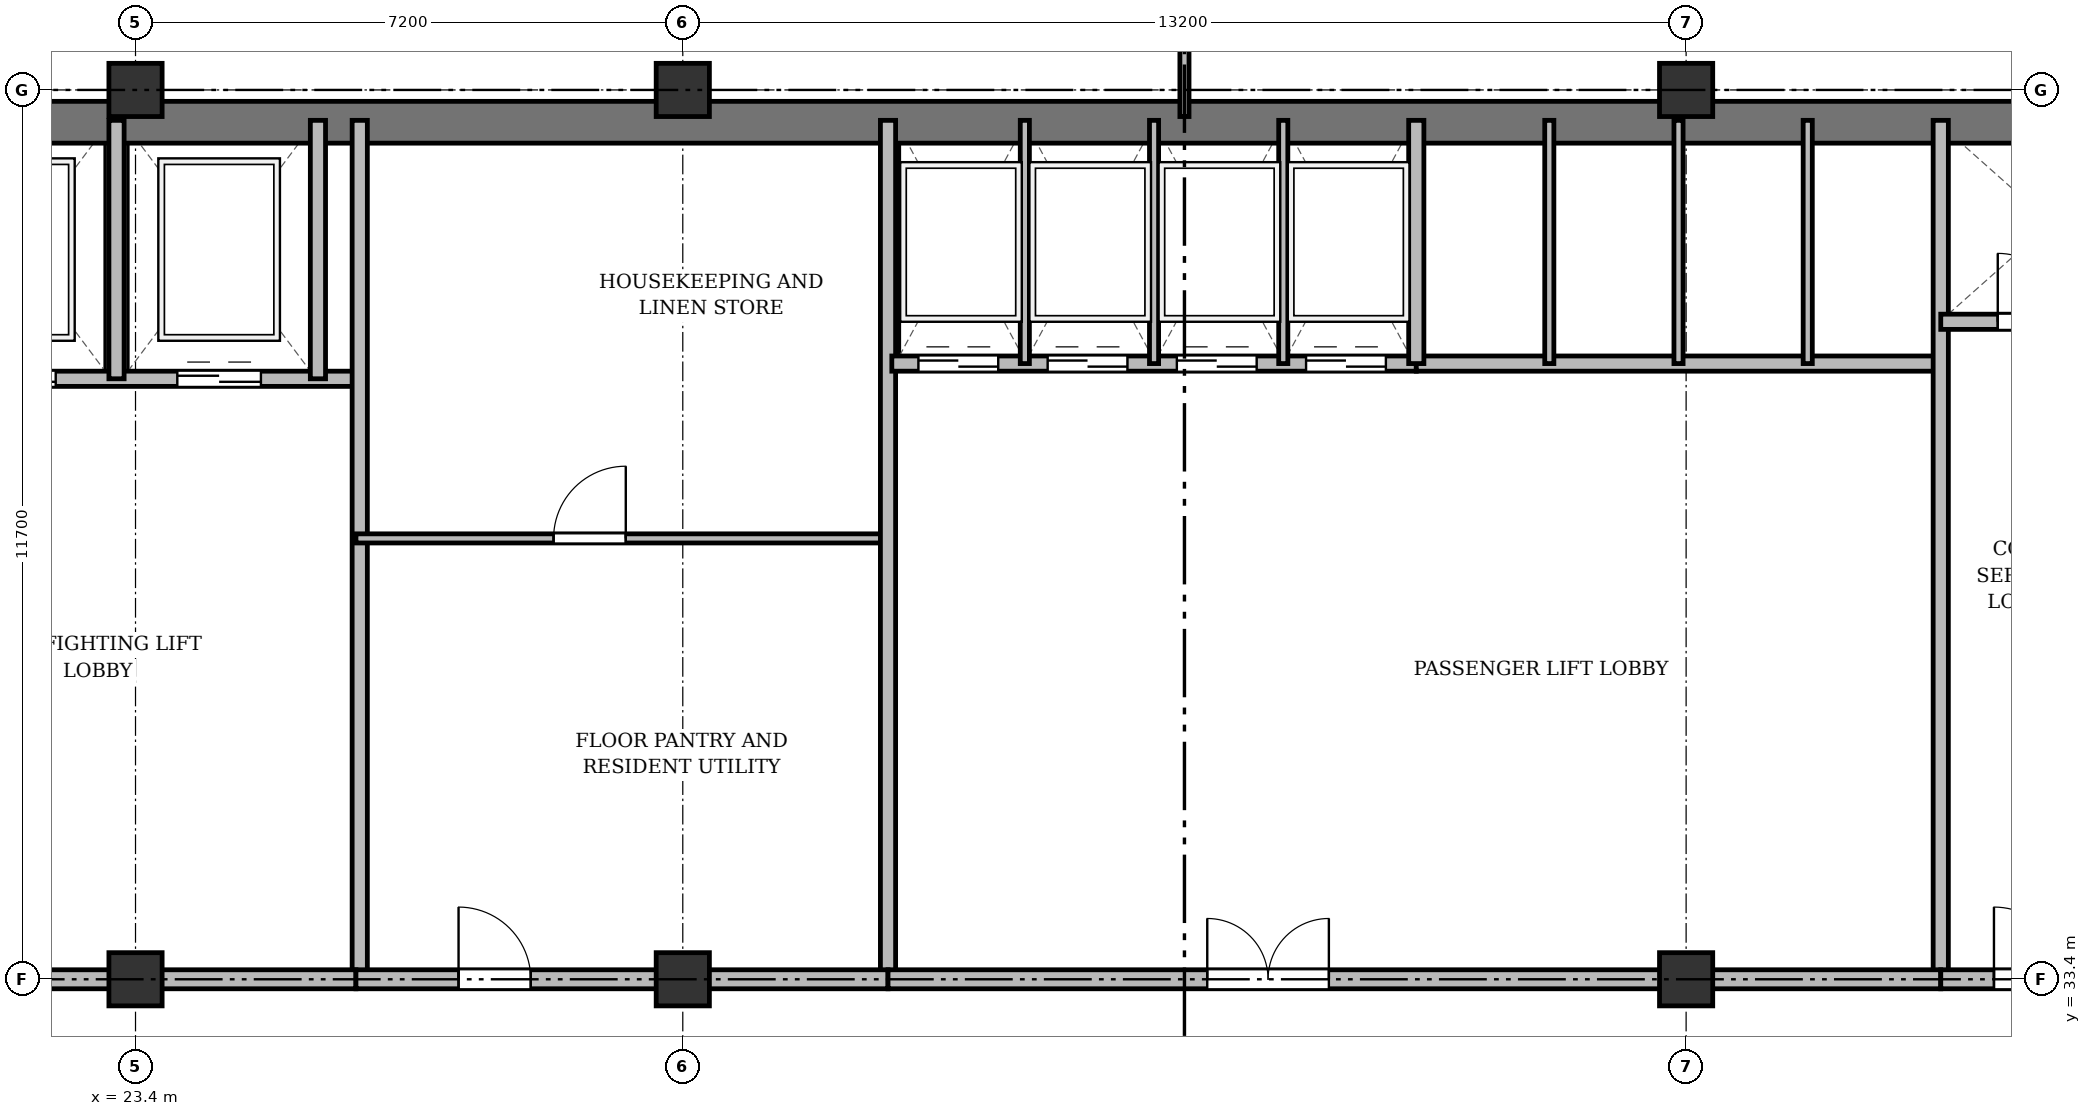
"""IFC4 building model, lengths in metres.
Left out: names, types, materials, properties, quantities, classifications, styles, units other than length and angle.
Written with IfcOpenShell. Run it as: python <this file> out.ifc"""

import sys

from ifc_helpers import new_model, si_unit, direction, frame, frame_2d, origin, origin_2d, place, context, subcontext, project, spatial, rectangle, extrude, source, transform, mapped, element, fill, save


model = new_model("IFC4")
c1 = context("Model", 3, precision=1e-05, world=origin(), true_north=direction((0.0, 1.0)))
c2 = subcontext(c1, "Body", "Model", "MODEL_VIEW")
j1 = project(units=[si_unit("LENGTHUNIT", "METRE"), si_unit("PLANEANGLEUNIT", "RADIAN")], contexts=[c1])
p1 = place(None, origin())
s1 = spatial("IfcSite", under=j1, at=p1, CompositionType="ELEMENT")
p2 = place(p1, origin())
s2 = spatial("IfcBuilding", under=s1, at=p2, CompositionType="ELEMENT")
p3 = place(p2, frame((0.0, 0.0, 190.5)))
s3 = spatial("IfcBuildingStorey", under=s2, at=p3, CompositionType="ELEMENT", Elevation=190.5)
m1 = source(origin(), c2, "Body", "SweptSolid", [
    extrude(rectangle(XDim=0.7, YDim=0.7, at=origin_2d()), origin(), (0.0, 0.0, 1.0), 3.6),
])
for number, where, z_axis, x_axis in (
    (1, (23.4, 33.4, 0.0), (0.0, 0.0, 1.0), (1.0, 0.0, 0.0)),
    (2, (23.4, 45.1, 0.0), (0.0, 0.0, 1.0), (1.0, 0.0, 0.0)),
    (3, (30.6, 33.4, 0.0), (0.0, 0.0, 1.0), (1.0, 0.0, 0.0)),
    (4, (30.6, 45.1, 0.0), (0.0, 0.0, 1.0), (1.0, 0.0, 0.0)),
    (5, (43.8, 33.4, 0.0), (0.0, 0.0, 1.0), (1.0, 0.0, 0.0)),
    (6, (43.8, 45.1, 0.0), (0.0, 0.0, 1.0), (1.0, 0.0, 0.0)),
):
    element("IfcColumn", number, at=place(p3, frame(where, z_axis=z_axis, x_axis=x_axis)), inside=s3, PredefinedType="COLUMN", context=c2, shape_type="MappedRepresentation", body=[
        mapped(m1, transform((0.0, 0.0, 0.0), x_axis=(1.0, 0.0, 0.0), y_axis=(0.0, 1.0, 0.0), z_axis=(0.0, 0.0, 1.0), scale=1.0)),
    ])
p4 = place(p3, frame((15.65, 44.675, 0.0), z_axis=(0.0, 0.0, 1.0), x_axis=(1.0, 0.0, 0.0)))
e7 = element("IfcWall", 7, at=p4, inside=s3, PredefinedType="SHEAR", context=c2, shape_type="SweptSolid", body=[
    extrude(rectangle(XDim=43.1, YDim=0.55, at=frame_2d((21.55, 0.0))), origin(), (0.0, 0.0, 1.0), 3.36),
])
p5 = place(p3, frame((19.55, 41.3, 0.0), z_axis=(0.0, 0.0, 1.0), x_axis=(1.0, 0.0, 0.0)))
e8 = element("IfcWall", 8, at=p5, inside=s3, PredefinedType="SOLIDWALL", context=c2, shape_type="SweptSolid", body=[
    extrude(rectangle(XDim=6.75, YDim=0.2, at=frame_2d((3.375, 0.0))), origin(), (0.0, 0.0, 1.0), 3.36),
])
p6 = place(p5, frame((1.7, 0.0, 0.0)))
e9 = element("IfcOpeningElement", 9, at=p6, cuts=e8, PredefinedType="OPENING", context=c2, shape_type="SweptSolid", body=[
    extrude(rectangle(XDim=1.1, YDim=2.15, at=frame_2d((0.55, 1.075))), frame((0.0, 0.11, 0.0), z_axis=(0.0, -1.0, 0.0), x_axis=(1.0, 0.0, 0.0)), (0.0, 0.0, 1.0), 0.22),
])
p7 = place(p5, frame((4.4, 0.0, 0.0)))
e10 = element("IfcOpeningElement", 10, at=p7, cuts=e8, PredefinedType="OPENING", context=c2, shape_type="SweptSolid", body=[
    extrude(rectangle(XDim=1.1, YDim=2.15, at=frame_2d((0.55, 1.075))), frame((0.0, 0.11, 0.0), z_axis=(0.0, -1.0, 0.0), x_axis=(1.0, 0.0, 0.0)), (0.0, 0.0, 1.0), 0.22),
])
for number, where, z_axis, x_axis in (
    (11, (23.15, 41.3, 0.0), (0.0, 0.0, 1.0), (0.0, 1.0, 0.0)),
    (12, (25.8, 41.3, 0.0), (0.0, 0.0, 1.0), (0.0, 1.0, 0.0)),
):
    element("IfcWall", number, at=place(p3, frame(where, z_axis=z_axis, x_axis=x_axis)), inside=s3, PredefinedType="SOLIDWALL", context=c2, shape_type="SweptSolid", body=[
        extrude(rectangle(XDim=3.4, YDim=0.2, at=frame_2d((1.7, 0.0))), origin(), (0.0, 0.0, 1.0), 3.36),
    ])
p8 = place(p3, frame((26.35, 33.4, 0.0), z_axis=(0.0, 0.0, 1.0), x_axis=(0.0, 1.0, 0.0)))
e13 = element("IfcWall", 13, at=p8, inside=s3, PredefinedType="SOLIDWALL", context=c2, shape_type="SweptSolid", body=[
    extrude(rectangle(XDim=11.3, YDim=0.2, at=frame_2d((5.65, 0.0))), origin(), (0.0, 0.0, 1.0), 2.91),
])
p9 = place(p3, frame((19.5, 33.4, 0.0), z_axis=(0.0, 0.0, 1.0), x_axis=(1.0, 0.0, 0.0)))
e14 = element("IfcWall", 14, at=p9, inside=s3, PredefinedType="PARTITIONING", context=c2, shape_type="SweptSolid", body=[
    extrude(rectangle(XDim=6.8, YDim=0.25, at=frame_2d((3.4, 0.0))), origin(), (0.0, 0.0, 1.0), 2.91),
])
p10 = place(p9, frame((0.75, 0.0, 0.0)))
e15 = element("IfcOpeningElement", 15, at=p10, cuts=e14, PredefinedType="OPENING", context=c2, shape_type="SweptSolid", body=[
    extrude(rectangle(XDim=1.6, YDim=2.2, at=frame_2d((0.8, 1.1))), frame((0.0, 0.135, 0.0), z_axis=(0.0, -1.0, 0.0), x_axis=(1.0, 0.0, 0.0)), (0.0, 0.0, 1.0), 0.27),
])
p11 = place(p3, frame((26.3, 39.2, 0.0), z_axis=(0.0, 0.0, 1.0), x_axis=(1.0, 0.0, 0.0)))
e16 = element("IfcWall", 16, at=p11, inside=s3, PredefinedType="PARTITIONING", context=c2, shape_type="SweptSolid", body=[
    extrude(rectangle(XDim=7.0, YDim=0.12, at=frame_2d((3.5, 0.0))), origin(), (0.0, 0.0, 1.0), 2.86),
])
p12 = place(p11, frame((2.6, 0.0, 0.0)))
e17 = element("IfcOpeningElement", 17, at=p12, cuts=e16, PredefinedType="OPENING", context=c2, shape_type="SweptSolid", body=[
    extrude(rectangle(XDim=0.95, YDim=2.15, at=frame_2d((0.475, 1.075))), frame((0.0, 0.07, 0.0), z_axis=(0.0, -1.0, 0.0), x_axis=(1.0, 0.0, 0.0)), (0.0, 0.0, 1.0), 0.14),
])
p13 = place(p3, frame((33.3, 33.4, 0.0), z_axis=(0.0, 0.0, 1.0), x_axis=(0.0, 1.0, 0.0)))
e18 = element("IfcWall", 18, at=p13, inside=s3, PredefinedType="SOLIDWALL", context=c2, shape_type="SweptSolid", body=[
    extrude(rectangle(XDim=11.3, YDim=0.2, at=frame_2d((5.65, 0.0))), origin(), (0.0, 0.0, 1.0), 2.91),
])
p14 = place(p3, frame((33.35, 41.5, 0.0), z_axis=(0.0, 0.0, 1.0), x_axis=(1.0, 0.0, 0.0)))
e19 = element("IfcWall", 19, at=p14, inside=s3, PredefinedType="SOLIDWALL", context=c2, shape_type="SweptSolid", body=[
    extrude(rectangle(XDim=6.9, YDim=0.2, at=frame_2d((3.45, 0.0))), origin(), (0.0, 0.0, 1.0), 3.36),
])
p15 = place(p14, frame((0.35, 0.0, 0.0)))
e20 = element("IfcOpeningElement", 20, at=p15, cuts=e19, PredefinedType="OPENING", context=c2, shape_type="SweptSolid", body=[
    extrude(rectangle(XDim=1.05, YDim=2.15, at=frame_2d((0.525, 1.075))), frame((0.0, 0.11, 0.0), z_axis=(0.0, -1.0, 0.0), x_axis=(1.0, 0.0, 0.0)), (0.0, 0.0, 1.0), 0.22),
])
p16 = place(p14, frame((2.05, 0.0, 0.0)))
e21 = element("IfcOpeningElement", 21, at=p16, cuts=e19, PredefinedType="OPENING", context=c2, shape_type="SweptSolid", body=[
    extrude(rectangle(XDim=1.05, YDim=2.15, at=frame_2d((0.525, 1.075))), frame((0.0, 0.11, 0.0), z_axis=(0.0, -1.0, 0.0), x_axis=(1.0, 0.0, 0.0)), (0.0, 0.0, 1.0), 0.22),
])
p17 = place(p14, frame((3.75, 0.0, 0.0)))
e22 = element("IfcOpeningElement", 22, at=p17, cuts=e19, PredefinedType="OPENING", context=c2, shape_type="SweptSolid", body=[
    extrude(rectangle(XDim=1.05, YDim=2.15, at=frame_2d((0.525, 1.075))), frame((0.0, 0.11, 0.0), z_axis=(0.0, -1.0, 0.0), x_axis=(1.0, 0.0, 0.0)), (0.0, 0.0, 1.0), 0.22),
])
p18 = place(p14, frame((5.45, 0.0, 0.0)))
e23 = element("IfcOpeningElement", 23, at=p18, cuts=e19, PredefinedType="OPENING", context=c2, shape_type="SweptSolid", body=[
    extrude(rectangle(XDim=1.05, YDim=2.15, at=frame_2d((0.525, 1.075))), frame((0.0, 0.11, 0.0), z_axis=(0.0, -1.0, 0.0), x_axis=(1.0, 0.0, 0.0)), (0.0, 0.0, 1.0), 0.22),
])
for number, where, z_axis, x_axis in (
    (24, (35.1, 41.5, 0.0), (0.0, 0.0, 1.0), (0.0, 1.0, 0.0)),
    (25, (36.8, 41.5, 0.0), (0.0, 0.0, 1.0), (0.0, 1.0, 0.0)),
    (26, (38.5, 41.5, 0.0), (0.0, 0.0, 1.0), (0.0, 1.0, 0.0)),
):
    element("IfcWall", number, at=place(p3, frame(where, z_axis=z_axis, x_axis=x_axis)), inside=s3, PredefinedType="PARTITIONING", context=c2, shape_type="SweptSolid", body=[
        extrude(rectangle(XDim=3.2, YDim=0.12, at=frame_2d((1.6, 0.0))), origin(), (0.0, 0.0, 1.0), 3.36),
    ])
p19 = place(p3, frame((40.25, 41.5, 0.0), z_axis=(0.0, 0.0, 1.0), x_axis=(1.0, 0.0, 0.0)))
e27 = element("IfcWall", 27, at=p19, inside=s3, PredefinedType="SOLIDWALL", context=c2, shape_type="SweptSolid", body=[
    extrude(rectangle(XDim=6.9, YDim=0.2, at=frame_2d((3.45, 0.0))), origin(), (0.0, 0.0, 1.0), 2.86),
])
p20 = place(p3, frame((40.25, 41.5, 0.0), z_axis=(0.0, 0.0, 1.0), x_axis=(0.0, 1.0, 0.0)))
e28 = element("IfcWall", 28, at=p20, inside=s3, PredefinedType="SOLIDWALL", context=c2, shape_type="SweptSolid", body=[
    extrude(rectangle(XDim=3.2, YDim=0.2, at=frame_2d((1.6, 0.0))), origin(), (0.0, 0.0, 1.0), 3.36),
])
p21 = place(p3, frame((42.0, 41.5, 0.0), z_axis=(0.0, 0.0, 1.0), x_axis=(0.0, 1.0, 0.0)))
e29 = element("IfcWall", 29, at=p21, inside=s3, PredefinedType="PARTITIONING", context=c2, shape_type="SweptSolid", body=[
    extrude(rectangle(XDim=3.2, YDim=0.12, at=frame_2d((1.6, 0.0))), origin(), (0.0, 0.0, 1.0), 3.36),
])
p22 = place(p3, frame((43.7, 41.5, 0.0), z_axis=(0.0, 0.0, 1.0), x_axis=(0.0, 1.0, 0.0)))
e30 = element("IfcWall", 30, at=p22, inside=s3, PredefinedType="PARTITIONING", context=c2, shape_type="SweptSolid", body=[
    extrude(rectangle(XDim=3.2, YDim=0.12, at=frame_2d((1.6, 0.0))), origin(), (0.0, 0.0, 1.0), 2.86),
])
p23 = place(p3, frame((45.4, 41.5, 0.0), z_axis=(0.0, 0.0, 1.0), x_axis=(0.0, 1.0, 0.0)))
e31 = element("IfcWall", 31, at=p23, inside=s3, PredefinedType="PARTITIONING", context=c2, shape_type="SweptSolid", body=[
    extrude(rectangle(XDim=3.2, YDim=0.12, at=frame_2d((1.6, 0.0))), origin(), (0.0, 0.0, 1.0), 3.36),
])
p24 = place(p3, frame((47.15, 33.4, 0.0), z_axis=(0.0, 0.0, 1.0), x_axis=(0.0, 1.0, 0.0)))
e32 = element("IfcWall", 32, at=p24, inside=s3, PredefinedType="SOLIDWALL", context=c2, shape_type="SweptSolid", body=[
    extrude(rectangle(XDim=11.3, YDim=0.2, at=frame_2d((5.65, 0.0))), origin(), (0.0, 0.0, 1.0), 2.91),
])
p25 = place(p3, frame((26.3, 33.4, 0.0), z_axis=(0.0, 0.0, 1.0), x_axis=(1.0, 0.0, 0.0)))
e33 = element("IfcWall", 33, at=p25, inside=s3, PredefinedType="PARTITIONING", context=c2, shape_type="SweptSolid", body=[
    extrude(rectangle(XDim=7.0, YDim=0.25, at=frame_2d((3.5, 0.0))), origin(), (0.0, 0.0, 1.0), 2.91),
])
p26 = place(p25, frame((1.35, 0.0, 0.0)))
e34 = element("IfcOpeningElement", 34, at=p26, cuts=e33, PredefinedType="OPENING", context=c2, shape_type="SweptSolid", body=[
    extrude(rectangle(XDim=0.95, YDim=2.15, at=frame_2d((0.475, 1.075))), frame((0.0, 0.135, 0.0), z_axis=(0.0, -1.0, 0.0), x_axis=(1.0, 0.0, 0.0)), (0.0, 0.0, 1.0), 0.27),
])
p27 = place(p3, frame((33.3, 33.4, 0.0), z_axis=(0.0, 0.0, 1.0), x_axis=(1.0, 0.0, 0.0)))
e35 = element("IfcWall", 35, at=p27, inside=s3, PredefinedType="PARTITIONING", context=c2, shape_type="SweptSolid", body=[
    extrude(rectangle(XDim=13.85, YDim=0.25, at=frame_2d((6.925, 0.0))), origin(), (0.0, 0.0, 1.0), 2.91),
])
p28 = place(p27, frame((4.2, 0.0, 0.0)))
e36 = element("IfcOpeningElement", 36, at=p28, cuts=e35, PredefinedType="OPENING", context=c2, shape_type="SweptSolid", body=[
    extrude(rectangle(XDim=1.6, YDim=2.2, at=frame_2d((0.8, 1.1))), frame((0.0, 0.135, 0.0), z_axis=(0.0, -1.0, 0.0), x_axis=(1.0, 0.0, 0.0)), (0.0, 0.0, 1.0), 0.27),
])
p29 = place(p3, frame((47.15, 42.05, 0.0), z_axis=(0.0, 0.0, 1.0), x_axis=(1.0, 0.0, 0.0)))
e37 = element("IfcWall", 37, at=p29, inside=s3, PredefinedType="SOLIDWALL", context=c2, shape_type="SweptSolid", body=[
    extrude(rectangle(XDim=7.85, YDim=0.2, at=frame_2d((3.925, 0.0))), origin(), (0.0, 0.0, 1.0), 2.86),
])
p30 = place(p29, frame((0.75, 0.0, 0.0)))
e38 = element("IfcOpeningElement", 38, at=p30, cuts=e37, PredefinedType="OPENING", context=c2, shape_type="SweptSolid", body=[
    extrude(rectangle(XDim=0.9, YDim=2.1, at=frame_2d((0.45, 1.05))), frame((0.0, 0.11, 0.0), z_axis=(0.0, -1.0, 0.0), x_axis=(1.0, 0.0, 0.0)), (0.0, 0.0, 1.0), 0.22),
])
p31 = place(p29, frame((3.85, 0.0, 0.0)))
e39 = element("IfcOpeningElement", 39, at=p31, cuts=e37, PredefinedType="OPENING", context=c2, shape_type="SweptSolid", body=[
    extrude(rectangle(XDim=0.9, YDim=2.1, at=frame_2d((0.45, 1.05))), frame((0.0, 0.11, 0.0), z_axis=(0.0, -1.0, 0.0), x_axis=(1.0, 0.0, 0.0)), (0.0, 0.0, 1.0), 0.22),
])
p32 = place(p3, frame((47.15, 33.4, 0.0), z_axis=(0.0, 0.0, 1.0), x_axis=(1.0, 0.0, 0.0)))
e40 = element("IfcWall", 40, at=p32, inside=s3, PredefinedType="PARTITIONING", context=c2, shape_type="SweptSolid", body=[
    extrude(rectangle(XDim=11.15, YDim=0.25, at=frame_2d((5.575, 0.0))), origin(), (0.0, 0.0, 1.0), 2.91),
])
p33 = place(p32, frame((0.7, 0.0, 0.0)))
e41 = element("IfcOpeningElement", 41, at=p33, cuts=e40, PredefinedType="OPENING", context=c2, shape_type="SweptSolid", body=[
    extrude(rectangle(XDim=0.95, YDim=2.15, at=frame_2d((0.475, 1.075))), frame((0.0, 0.135, 0.0), z_axis=(0.0, -1.0, 0.0), x_axis=(1.0, 0.0, 0.0)), (0.0, 0.0, 1.0), 0.27),
])
p34 = place(p32, frame((6.0, 0.0, 0.0)))
e42 = element("IfcOpeningElement", 42, at=p34, cuts=e40, PredefinedType="OPENING", context=c2, shape_type="SweptSolid", body=[
    extrude(rectangle(XDim=1.2, YDim=2.15, at=frame_2d((0.6, 1.075))), frame((0.0, 0.135, 0.0), z_axis=(0.0, -1.0, 0.0), x_axis=(1.0, 0.0, 0.0)), (0.0, 0.0, 1.0), 0.27),
])
p35 = place(p3, frame((37.2, 44.75, 0.0), z_axis=(0.0, 0.0, 1.0), x_axis=(0.0, 1.0, 0.0)))
e43 = element("IfcWall", 43, at=p35, inside=s3, PredefinedType="PARTITIONING", context=c2, shape_type="SweptSolid", body=[
    extrude(rectangle(XDim=3.61, YDim=0.12, at=frame_2d((1.805, 0.0))), origin(), (0.0, 0.0, 1.0), 2.91),
])
p36 = place(p35, frame((1.1, 0.0, 0.0)))
e44 = element("IfcOpeningElement", 44, at=p36, cuts=e43, PredefinedType="OPENING", context=c2, shape_type="SweptSolid", body=[
    extrude(rectangle(XDim=0.95, YDim=2.15, at=frame_2d((0.475, 1.075))), frame((0.0, 0.07, 0.0), z_axis=(0.0, -1.0, 0.0), x_axis=(1.0, 0.0, 0.0)), (0.0, 0.0, 1.0), 0.14),
])
m2 = source(origin(), c2, "Body", "SweptSolid", [
    extrude(rectangle(XDim=1.1, YDim=2.15, at=frame_2d((0.55, 1.075))), frame((0.0, 0.025, 0.0), z_axis=(0.0, -1.0, 0.0), x_axis=(1.0, 0.0, 0.0)), (0.0, 0.0, 1.0), 0.05),
])
p37 = place(p6, origin())
e45 = element("IfcDoor", 45, at=p37, inside=s3, OperationType="DOUBLE_DOOR_SLIDING", PredefinedType="DOOR", context=c2, shape_type="MappedRepresentation", body=[
    mapped(m2, transform((0.0, 0.0, 0.0), x_axis=(1.0, 0.0, 0.0), y_axis=(0.0, 1.0, 0.0), z_axis=(0.0, 0.0, 1.0), scale=1.0)),
])
fill(e9, e45)
p38 = place(p7, origin())
e46 = element("IfcDoor", 46, at=p38, inside=s3, OperationType="DOUBLE_DOOR_SLIDING", PredefinedType="DOOR", context=c2, shape_type="MappedRepresentation", body=[
    mapped(m2, transform((0.0, 0.0, 0.0), x_axis=(1.0, 0.0, 0.0), y_axis=(0.0, 1.0, 0.0), z_axis=(0.0, 0.0, 1.0), scale=1.0)),
])
fill(e10, e46)
m3 = source(origin(), c2, "Body", "SweptSolid", [
    extrude(rectangle(XDim=0.95, YDim=2.15, at=frame_2d((0.475, 1.075))), frame((0.0, 0.025, 0.0), z_axis=(0.0, -1.0, 0.0), x_axis=(1.0, 0.0, 0.0)), (0.0, 0.0, 1.0), 0.05),
])
p39 = place(p12, origin())
e47 = element("IfcDoor", 47, at=p39, inside=s3, OperationType="SINGLE_SWING_RIGHT", PredefinedType="DOOR", context=c2, shape_type="MappedRepresentation", body=[
    mapped(m3, transform((0.0, 0.0, 0.0), x_axis=(1.0, 0.0, 0.0), y_axis=(0.0, 1.0, 0.0), z_axis=(0.0, 0.0, 1.0), scale=1.0)),
])
fill(e17, e47)
m4 = source(origin(), c2, "Body", "SweptSolid", [
    extrude(rectangle(XDim=1.05, YDim=2.15, at=frame_2d((0.525, 1.075))), frame((0.0, 0.025, 0.0), z_axis=(0.0, -1.0, 0.0), x_axis=(1.0, 0.0, 0.0)), (0.0, 0.0, 1.0), 0.05),
])
p40 = place(p15, origin())
e48 = element("IfcDoor", 48, at=p40, inside=s3, OperationType="DOUBLE_DOOR_SLIDING", PredefinedType="DOOR", context=c2, shape_type="MappedRepresentation", body=[
    mapped(m4, transform((0.0, 0.0, 0.0), x_axis=(1.0, 0.0, 0.0), y_axis=(0.0, 1.0, 0.0), z_axis=(0.0, 0.0, 1.0), scale=1.0)),
])
fill(e20, e48)
p41 = place(p16, origin())
e49 = element("IfcDoor", 49, at=p41, inside=s3, OperationType="DOUBLE_DOOR_SLIDING", PredefinedType="DOOR", context=c2, shape_type="MappedRepresentation", body=[
    mapped(m4, transform((0.0, 0.0, 0.0), x_axis=(1.0, 0.0, 0.0), y_axis=(0.0, 1.0, 0.0), z_axis=(0.0, 0.0, 1.0), scale=1.0)),
])
fill(e21, e49)
p42 = place(p17, origin())
e50 = element("IfcDoor", 50, at=p42, inside=s3, OperationType="DOUBLE_DOOR_SLIDING", PredefinedType="DOOR", context=c2, shape_type="MappedRepresentation", body=[
    mapped(m4, transform((0.0, 0.0, 0.0), x_axis=(1.0, 0.0, 0.0), y_axis=(0.0, 1.0, 0.0), z_axis=(0.0, 0.0, 1.0), scale=1.0)),
])
fill(e22, e50)
p43 = place(p18, origin())
e51 = element("IfcDoor", 51, at=p43, inside=s3, OperationType="DOUBLE_DOOR_SLIDING", PredefinedType="DOOR", context=c2, shape_type="MappedRepresentation", body=[
    mapped(m4, transform((0.0, 0.0, 0.0), x_axis=(1.0, 0.0, 0.0), y_axis=(0.0, 1.0, 0.0), z_axis=(0.0, 0.0, 1.0), scale=1.0)),
])
fill(e23, e51)
p44 = place(p26, origin())
e52 = element("IfcDoor", 52, at=p44, inside=s3, OperationType="SINGLE_SWING_LEFT", PredefinedType="DOOR", context=c2, shape_type="MappedRepresentation", body=[
    mapped(m3, transform((0.0, 0.0, 0.0), x_axis=(1.0, 0.0, 0.0), y_axis=(0.0, 1.0, 0.0), z_axis=(0.0, 0.0, 1.0), scale=1.0)),
])
fill(e34, e52)
m5 = source(origin(), c2, "Body", "SweptSolid", [
    extrude(rectangle(XDim=1.6, YDim=2.2, at=frame_2d((0.8, 1.1))), frame((0.0, 0.025, 0.0), z_axis=(0.0, -1.0, 0.0), x_axis=(1.0, 0.0, 0.0)), (0.0, 0.0, 1.0), 0.05),
])
p45 = place(p28, origin())
e53 = element("IfcDoor", 53, at=p45, inside=s3, OperationType="DOUBLE_DOOR_SINGLE_SWING", PredefinedType="DOOR", context=c2, shape_type="MappedRepresentation", body=[
    mapped(m5, transform((0.0, 0.0, 0.0), x_axis=(1.0, 0.0, 0.0), y_axis=(0.0, 1.0, 0.0), z_axis=(0.0, 0.0, 1.0), scale=1.0)),
])
fill(e36, e53)
m6 = source(origin(), c2, "Body", "SweptSolid", [
    extrude(rectangle(XDim=0.9, YDim=2.1, at=frame_2d((0.45, 1.05))), frame((0.0, 0.025, 0.0), z_axis=(0.0, -1.0, 0.0), x_axis=(1.0, 0.0, 0.0)), (0.0, 0.0, 1.0), 0.05),
])
p46 = place(p30, origin())
e54 = element("IfcDoor", 54, at=p46, inside=s3, OperationType="SINGLE_SWING_LEFT", PredefinedType="DOOR", context=c2, shape_type="MappedRepresentation", body=[
    mapped(m6, transform((0.0, 0.0, 0.0), x_axis=(1.0, 0.0, 0.0), y_axis=(0.0, 1.0, 0.0), z_axis=(0.0, 0.0, 1.0), scale=1.0)),
])
fill(e38, e54)
p47 = place(p33, origin())
e55 = element("IfcDoor", 55, at=p47, inside=s3, OperationType="SINGLE_SWING_LEFT", PredefinedType="DOOR", context=c2, shape_type="MappedRepresentation", body=[
    mapped(m3, transform((0.0, 0.0, 0.0), x_axis=(1.0, 0.0, 0.0), y_axis=(0.0, 1.0, 0.0), z_axis=(0.0, 0.0, 1.0), scale=1.0)),
])
fill(e41, e55)
save(model, sys.argv[1])
